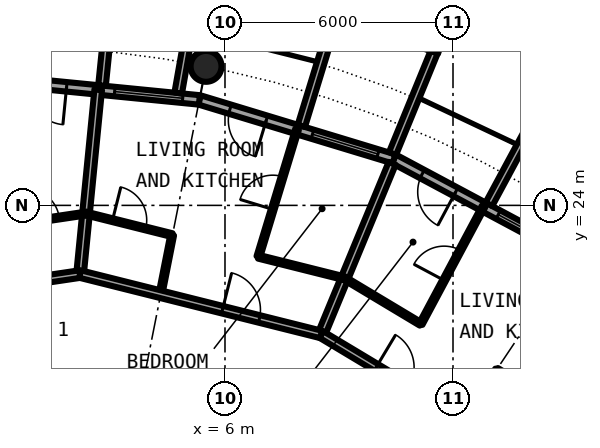
"""IFC4 building model, lengths in metres.
Left out: names, types, materials, properties, quantities, classifications, styles, units other than length and angle.
Written with IfcOpenShell. Run it as: python <this file> out.ifc"""

import sys

from ifc_helpers import new_model, si_unit, direction, frame, frame_2d, origin, origin_2d, place, context, subcontext, project, spatial, rectangle, circle, hollow_circle, extrude, element, fill, save


model = new_model("IFC4")
c1 = context("Model", 3, precision=1e-05, world=origin(), true_north=direction((0.0, 1.0)))
c2 = subcontext(c1, "Body", "Model", "MODEL_VIEW")
j1 = project(units=[si_unit("LENGTHUNIT", "METRE"), si_unit("PLANEANGLEUNIT", "RADIAN")], contexts=[c1])
p1 = place(None, origin())
s1 = spatial("IfcSite", under=j1, at=p1, CompositionType="ELEMENT")
p2 = place(p1, origin())
s2 = spatial("IfcBuilding", under=s1, at=p2, CompositionType="ELEMENT")
p3 = place(p2, frame((0.0, 0.0, 145.2)))
s3 = spatial("IfcBuildingStorey", under=s2, at=p3, CompositionType="ELEMENT", Elevation=145.2)
p4 = place(p3, frame((5.501, 27.658, 0.0), z_axis=(0.0, 0.0, 1.0), x_axis=(1.0, 0.0, 0.0)))
e1 = element("IfcColumn", 1, at=p4, inside=s3, PredefinedType="COLUMN", context=c2, shape_type="SweptSolid", body=[
    extrude(hollow_circle(Radius=0.406, WallThickness=0.04, at=origin_2d()), origin(), (0.0, 0.0, 1.0), 3.05),
])
p5 = place(p3, frame((15.167, 22.699, 0.0), z_axis=(0.0, 0.0, 1.0), x_axis=(-0.881915646801, 0.471407246368, 0.0)))
e2 = element("IfcWall", 2, at=p5, inside=s3, PredefinedType="SOLIDWALL", context=c2, shape_type="SweptSolid", body=[
    extrude(rectangle(XDim=5.352, YDim=0.25, at=frame_2d((2.676, 0.0))), origin(), (0.0, 0.0, 1.0), 2.7),
])
p6 = place(p5, frame((0.441, 0.0, 0.3)))
e3 = element("IfcOpeningElement", 3, at=p6, cuts=e2, PredefinedType="OPENING", context=c2, shape_type="SweptSolid", body=[
    extrude(rectangle(XDim=1.8, YDim=2.1, at=frame_2d((0.9, 1.05))), frame((0.0, 0.135, 0.0), z_axis=(0.0, -1.0, 0.0), x_axis=(1.0, 0.0, 0.0)), (0.0, 0.0, 1.0), 0.27),
])
p7 = place(p5, frame((3.51, 0.0, 0.0)))
e4 = element("IfcOpeningElement", 4, at=p7, cuts=e2, PredefinedType="OPENING", context=c2, shape_type="SweptSolid", body=[
    extrude(rectangle(XDim=1.0, YDim=2.2, at=frame_2d((0.5, 1.1))), frame((0.0, 0.135, 0.0), z_axis=(0.0, -1.0, 0.0), x_axis=(1.0, 0.0, 0.0)), (0.0, 0.0, 1.0), 0.27),
])
p8 = place(p3, frame((12.945, 24.029, -0.03), z_axis=(0.0, 0.0, 1.0), x_axis=(0.474424310775, 0.88029629861, 0.0)))
e5 = element("IfcWall", 5, at=p8, inside=s3, PredefinedType="SOLIDWALL", context=c2, shape_type="SweptSolid", body=[
    extrude(rectangle(XDim=3.006, YDim=0.2, at=frame_2d((1.503, 0.0))), origin(), (0.0, 0.0, 1.0), 2.73),
])
p9 = place(p3, frame((10.447, 25.222, 0.0), z_axis=(0.0, 0.0, 1.0), x_axis=(-0.956965678721, 0.290201119486, 0.0)))
e6 = element("IfcWall", 6, at=p9, inside=s3, PredefinedType="SOLIDWALL", context=c2, shape_type="SweptSolid", body=[
    extrude(rectangle(XDim=5.351, YDim=0.25, at=frame_2d((2.676, 0.0))), origin(), (0.0, 0.0, 1.0), 2.7),
])
p10 = place(p9, frame((0.441, 0.0, 0.3)))
e7 = element("IfcOpeningElement", 7, at=p10, cuts=e6, PredefinedType="OPENING", context=c2, shape_type="SweptSolid", body=[
    extrude(rectangle(XDim=1.8, YDim=2.1, at=frame_2d((0.9, 1.05))), frame((0.0, 0.135, 0.0), z_axis=(0.0, -1.0, 0.0), x_axis=(1.0, 0.0, 0.0)), (0.0, 0.0, 1.0), 0.27),
])
p11 = place(p9, frame((3.51, 0.0, 0.0)))
e8 = element("IfcOpeningElement", 8, at=p11, cuts=e6, PredefinedType="OPENING", context=c2, shape_type="SweptSolid", body=[
    extrude(rectangle(XDim=1.0, YDim=2.2, at=frame_2d((0.5, 1.1))), frame((0.0, 0.135, 0.0), z_axis=(0.0, -1.0, 0.0), x_axis=(1.0, 0.0, 0.0)), (0.0, 0.0, 1.0), 0.27),
])
p12 = place(p3, frame((11.638, 28.084, -0.03), z_axis=(0.0, 0.0, 1.0), x_axis=(-0.941461077774, 0.337121697664, 0.0)))
e9 = element("IfcWall", 9, at=p12, inside=s3, PredefinedType="SOLIDWALL", context=c2, shape_type="SweptSolid", body=[
    extrude(rectangle(XDim=2.993, YDim=0.2, at=frame_2d((1.497, 0.0))), origin(), (0.0, 0.0, 1.0), 2.73),
])
p13 = place(p12, frame((0.457, 0.0, 0.33)))
e10 = element("IfcOpeningElement", 10, at=p13, cuts=e9, PredefinedType="OPENING", context=c2, shape_type="SweptSolid", body=[
    extrude(circle(Radius=1.04, at=frame_2d((1.04, 1.04))), frame((0.0, 0.11, 0.0), z_axis=(0.0, -1.0, 0.0), x_axis=(1.0, 0.0, 0.0)), (0.0, 0.0, 1.0), 0.22),
])
p14 = place(p3, frame((10.409, 25.364, -0.03), z_axis=(0.0, 0.0, 1.0), x_axis=(0.379509886562, 0.925187681501, 0.0)))
e11 = element("IfcWall", 11, at=p14, inside=s3, PredefinedType="SOLIDWALL", context=c2, shape_type="SweptSolid", body=[
    extrude(rectangle(XDim=2.883, YDim=0.2, at=frame_2d((1.441, 0.0))), origin(), (0.0, 0.0, 1.0), 2.73),
])
p15 = place(p3, frame((8.009, 26.092, -0.03), z_axis=(0.0, 0.0, 1.0), x_axis=(0.293406695073, 0.955987715029, 0.0)))
e12 = element("IfcWall", 12, at=p15, inside=s3, PredefinedType="SOLIDWALL", context=c2, shape_type="SweptSolid", body=[
    extrude(rectangle(XDim=3.006, YDim=0.2, at=frame_2d((1.503, 0.0))), origin(), (0.0, 0.0, 1.0), 2.73),
])
p16 = place(p3, frame((5.326, 26.775, 0.0), z_axis=(0.0, 0.0, 1.0), x_axis=(-0.995173996315, 0.098126026407, 0.0)))
e13 = element("IfcWall", 13, at=p16, inside=s3, PredefinedType="SOLIDWALL", context=c2, shape_type="SweptSolid", body=[
    extrude(rectangle(XDim=5.352, YDim=0.25, at=frame_2d((2.676, 0.0))), origin(), (0.0, 0.0, 1.0), 2.7),
])
p17 = place(p16, frame((0.441, 0.0, 0.3)))
e14 = element("IfcOpeningElement", 14, at=p17, cuts=e13, PredefinedType="OPENING", context=c2, shape_type="SweptSolid", body=[
    extrude(rectangle(XDim=1.8, YDim=2.1, at=frame_2d((0.9, 1.05))), frame((0.0, 0.135, 0.0), z_axis=(0.0, -1.0, 0.0), x_axis=(1.0, 0.0, 0.0)), (0.0, 0.0, 1.0), 0.27),
])
p18 = place(p16, frame((3.51, 0.0, 0.0)))
e15 = element("IfcOpeningElement", 15, at=p18, cuts=e13, PredefinedType="OPENING", context=c2, shape_type="SweptSolid", body=[
    extrude(rectangle(XDim=1.0, YDim=2.2, at=frame_2d((0.5, 1.1))), frame((0.0, 0.135, 0.0), z_axis=(0.0, -1.0, 0.0), x_axis=(1.0, 0.0, 0.0)), (0.0, 0.0, 1.0), 0.27),
])
p19 = place(p3, frame((4.769, 26.956, -0.03), z_axis=(0.0, 0.0, 1.0), x_axis=(0.174056778901, 0.984735618183, 0.0)))
e16 = element("IfcWall", 16, at=p19, inside=s3, PredefinedType="SOLIDWALL", context=c2, shape_type="SweptSolid", body=[
    extrude(rectangle(XDim=2.925, YDim=0.2, at=frame_2d((1.462, 0.0))), origin(), (0.0, 0.0, 1.0), 2.73),
])
p20 = place(p3, frame((2.764, 27.153, -0.03), z_axis=(0.0, 0.0, 1.0), x_axis=(0.101505487237, 0.994834979311, 0.0)))
e17 = element("IfcWall", 17, at=p20, inside=s3, PredefinedType="SOLIDWALL", context=c2, shape_type="SweptSolid", body=[
    extrude(rectangle(XDim=3.007, YDim=0.2, at=frame_2d((1.503, 0.0))), origin(), (0.0, 0.0, 1.0), 2.73),
])
p21 = place(p3, frame((4.302, 21.663, 0.0), z_axis=(0.0, 0.0, 1.0), x_axis=(0.194485862594, 0.980905321247, 0.0)))
e18 = element("IfcWall", 18, at=p21, inside=s3, PredefinedType="PARTITIONING", context=c2, shape_type="SweptSolid", body=[
    extrude(rectangle(XDim=1.584, YDim=0.1, at=frame_2d((0.792, 0.0))), origin(), (0.0, 0.0, 1.0), 2.7),
])
p22 = place(p3, frame((2.186, 22.193, 0.0), z_axis=(0.0, 0.0, 1.0), x_axis=(0.098070432075, 0.995179476453, 0.0)))
e19 = element("IfcWall", 19, at=p22, inside=s3, PredefinedType="PARTITIONING", context=c2, shape_type="SweptSolid", body=[
    extrude(rectangle(XDim=4.874, YDim=0.2, at=frame_2d((2.437, 0.0))), origin(), (0.0, 0.0, 1.0), 2.7),
])
p23 = place(p3, frame((6.878, 22.649, 0.0), z_axis=(0.0, 0.0, 1.0), x_axis=(0.290784578865, 0.956788549625, 0.0)))
e20 = element("IfcWall", 20, at=p23, inside=s3, PredefinedType="PARTITIONING", context=c2, shape_type="SweptSolid", body=[
    extrude(rectangle(XDim=3.504, YDim=0.1, at=frame_2d((1.752, 0.0))), origin(), (0.0, 0.0, 1.0), 2.7),
])
p24 = place(p23, frame((1.302, 0.0, 0.0)))
e21 = element("IfcOpeningElement", 21, at=p24, cuts=e20, PredefinedType="OPENING", context=c2, shape_type="SweptSolid", body=[
    extrude(rectangle(XDim=0.9, YDim=2.3, at=frame_2d((0.45, 1.15))), frame((0.0, 0.06, 0.0), z_axis=(0.0, -1.0, 0.0), x_axis=(1.0, 0.0, 0.0)), (0.0, 0.0, 1.0), 0.12),
])
p25 = place(p3, frame((8.534, 20.603, 0.0), z_axis=(0.0, 0.0, 1.0), x_axis=(0.382651153718, 0.923892902104, 0.0)))
e22 = element("IfcWall", 22, at=p25, inside=s3, PredefinedType="PARTITIONING", context=c2, shape_type="SweptSolid", body=[
    extrude(rectangle(XDim=4.874, YDim=0.2, at=frame_2d((2.437, 0.0))), origin(), (0.0, 0.0, 1.0), 2.7),
])
p26 = place(p3, frame((11.151, 20.879, 0.0), z_axis=(0.0, 0.0, 1.0), x_axis=(0.471372600501, 0.881934165058, 0.0)))
e23 = element("IfcWall", 23, at=p26, inside=s3, PredefinedType="PARTITIONING", context=c2, shape_type="SweptSolid", body=[
    extrude(rectangle(XDim=3.505, YDim=0.1, at=frame_2d((1.752, 0.0))), origin(), (0.0, 0.0, 1.0), 2.7),
])
p27 = place(p26, frame((1.302, 0.0, 0.0)))
e24 = element("IfcOpeningElement", 24, at=p27, cuts=e23, PredefinedType="OPENING", context=c2, shape_type="SweptSolid", body=[
    extrude(rectangle(XDim=0.9, YDim=2.3, at=frame_2d((0.45, 1.15))), frame((0.0, 0.06, 0.0), z_axis=(0.0, -1.0, 0.0), x_axis=(1.0, 0.0, 0.0)), (0.0, 0.0, 1.0), 0.12),
])
p28 = place(p3, frame((-8.534, 20.603, 0.0), z_axis=(0.0, 0.0, 1.0), x_axis=(0.989177441421, 0.146724194948, 0.0)))
e25 = element("IfcWall", 25, at=p28, inside=s3, PredefinedType="PARTITIONING", context=c2, shape_type="SweptSolid", body=[
    extrude(rectangle(XDim=10.837, YDim=0.2, at=frame_2d((5.418, 0.0))), origin(), (0.0, 0.0, 1.0), 2.7),
])
p29 = place(p28, frame((3.835, 0.0, 0.0)))
e26 = element("IfcOpeningElement", 26, at=p29, cuts=e25, PredefinedType="OPENING", context=c2, shape_type="SweptSolid", body=[
    extrude(rectangle(XDim=1.0, YDim=2.3, at=frame_2d((0.5, 1.15))), frame((0.0, 0.11, 0.0), z_axis=(0.0, -1.0, 0.0), x_axis=(1.0, 0.0, 0.0)), (0.0, 0.0, 1.0), 0.22),
])
p30 = place(p3, frame((2.186, 22.193, 0.0), z_axis=(0.0, 0.0, 1.0), x_axis=(0.97003047456, -0.242983288366, 0.0)))
e27 = element("IfcWall", 27, at=p30, inside=s3, PredefinedType="PARTITIONING", context=c2, shape_type="SweptSolid", body=[
    extrude(rectangle(XDim=6.544, YDim=0.2, at=frame_2d((3.272, 0.0))), origin(), (0.0, 0.0, 1.0), 2.7),
])
p31 = place(p30, frame((3.863, 0.0, 0.0)))
e28 = element("IfcOpeningElement", 28, at=p31, cuts=e27, PredefinedType="OPENING", context=c2, shape_type="SweptSolid", body=[
    extrude(rectangle(XDim=1.0, YDim=2.3, at=frame_2d((0.5, 1.15))), frame((0.0, 0.11, 0.0), z_axis=(0.0, -1.0, 0.0), x_axis=(1.0, 0.0, 0.0)), (0.0, 0.0, 1.0), 0.22),
])
p32 = place(p3, frame((8.534, 20.603, 0.0), z_axis=(0.0, 0.0, 1.0), x_axis=(0.857683781508, -0.514177528621, 0.0)))
e29 = element("IfcWall", 29, at=p32, inside=s3, PredefinedType="PARTITIONING", context=c2, shape_type="SweptSolid", body=[
    extrude(rectangle(XDim=6.544, YDim=0.2, at=frame_2d((3.272, 0.0))), origin(), (0.0, 0.0, 1.0), 2.7),
])
p33 = place(p32, frame((1.682, 0.0, 0.0)))
e30 = element("IfcOpeningElement", 30, at=p33, cuts=e29, PredefinedType="OPENING", context=c2, shape_type="SweptSolid", body=[
    extrude(rectangle(XDim=1.0, YDim=2.3, at=frame_2d((0.5, 1.15))), frame((0.0, 0.11, 0.0), z_axis=(0.0, -1.0, 0.0), x_axis=(1.0, 0.0, 0.0)), (0.0, 0.0, 1.0), 0.22),
])
p34 = place(p3, frame((0.045, 23.444, 0.0), z_axis=(0.0, 0.0, 1.0), x_axis=(0.989180881673, 0.146700999768, 0.0)))
e31 = element("IfcWall", 31, at=p34, inside=s3, PredefinedType="PARTITIONING", context=c2, shape_type="SweptSolid", body=[
    extrude(rectangle(XDim=2.323, YDim=0.1, at=frame_2d((1.162, 0.0))), origin(), (0.0, 0.0, 1.0), 2.7),
])
p35 = place(p34, frame((0.712, 0.0, 0.0)))
e32 = element("IfcOpeningElement", 32, at=p35, cuts=e31, PredefinedType="OPENING", context=c2, shape_type="SweptSolid", body=[
    extrude(rectangle(XDim=0.9, YDim=2.3, at=frame_2d((0.45, 1.15))), frame((0.0, 0.06, 0.0), z_axis=(0.0, -1.0, 0.0), x_axis=(1.0, 0.0, 0.0)), (0.0, 0.0, 1.0), 0.12),
])
p36 = place(p3, frame((2.343, 23.785, 0.0), z_axis=(0.0, 0.0, 1.0), x_axis=(0.970031792706, -0.242978026043, 0.0)))
e33 = element("IfcWall", 33, at=p36, inside=s3, PredefinedType="PARTITIONING", context=c2, shape_type="SweptSolid", body=[
    extrude(rectangle(XDim=2.337, YDim=0.1, at=frame_2d((1.168, 0.0))), origin(), (0.0, 0.0, 1.0), 2.7),
])
p37 = place(p36, frame((0.719, 0.0, 0.0)))
e34 = element("IfcOpeningElement", 34, at=p37, cuts=e33, PredefinedType="OPENING", context=c2, shape_type="SweptSolid", body=[
    extrude(rectangle(XDim=0.9, YDim=2.3, at=frame_2d((0.45, 1.15))), frame((0.0, 0.06, 0.0), z_axis=(0.0, -1.0, 0.0), x_axis=(1.0, 0.0, 0.0)), (0.0, 0.0, 1.0), 0.12),
])
p38 = place(p3, frame((6.88, 22.648, 0.0), z_axis=(0.0, 0.0, 1.0), x_axis=(0.9700564467, -0.242879579658, 0.0)))
e35 = element("IfcWall", 35, at=p38, inside=s3, PredefinedType="PARTITIONING", context=c2, shape_type="SweptSolid", body=[
    extrude(rectangle(XDim=2.338, YDim=0.1, at=frame_2d((1.169, 0.0))), origin(), (0.0, 0.0, 1.0), 2.7),
])
p39 = place(p3, frame((9.146, 22.081, 0.0), z_axis=(0.0, 0.0, 1.0), x_axis=(0.857640331606, -0.514249999127, 0.0)))
e36 = element("IfcWall", 36, at=p39, inside=s3, PredefinedType="PARTITIONING", context=c2, shape_type="SweptSolid", body=[
    extrude(rectangle(XDim=2.338, YDim=0.1, at=frame_2d((1.169, 0.0))), origin(), (0.0, 0.0, 1.0), 2.7),
])
p40 = place(p6, origin())
e37 = element("IfcWindow", 37, at=p40, inside=s3, PartitioningType="SINGLE_PANEL", PredefinedType="WINDOW", context=c2, shape_type="SweptSolid", body=[
    extrude(rectangle(XDim=1.8, YDim=2.1, at=frame_2d((0.9, 1.05))), frame((0.0, 0.03, 0.0), z_axis=(0.0, -1.0, 0.0), x_axis=(1.0, 0.0, 0.0)), (0.0, 0.0, 1.0), 0.06),
])
fill(e3, e37)
p41 = place(p7, origin())
e38 = element("IfcDoor", 38, at=p41, inside=s3, OperationType="SINGLE_SWING_LEFT", PredefinedType="DOOR", context=c2, shape_type="SweptSolid", body=[
    extrude(rectangle(XDim=1.0, YDim=2.2, at=frame_2d((0.5, 1.1))), frame((0.0, 0.025, 0.0), z_axis=(0.0, -1.0, 0.0), x_axis=(1.0, 0.0, 0.0)), (0.0, 0.0, 1.0), 0.05),
])
fill(e4, e38)
p42 = place(p10, origin())
e39 = element("IfcWindow", 39, at=p42, inside=s3, PartitioningType="SINGLE_PANEL", PredefinedType="WINDOW", context=c2, shape_type="SweptSolid", body=[
    extrude(rectangle(XDim=1.8, YDim=2.1, at=frame_2d((0.9, 1.05))), frame((0.0, 0.03, 0.0), z_axis=(0.0, -1.0, 0.0), x_axis=(1.0, 0.0, 0.0)), (0.0, 0.0, 1.0), 0.06),
])
fill(e7, e39)
p43 = place(p11, origin())
e40 = element("IfcDoor", 40, at=p43, inside=s3, OperationType="SINGLE_SWING_LEFT", PredefinedType="DOOR", context=c2, shape_type="SweptSolid", body=[
    extrude(rectangle(XDim=1.0, YDim=2.2, at=frame_2d((0.5, 1.1))), frame((0.0, 0.025, 0.0), z_axis=(0.0, -1.0, 0.0), x_axis=(1.0, 0.0, 0.0)), (0.0, 0.0, 1.0), 0.05),
])
fill(e8, e40)
p44 = place(p17, origin())
e41 = element("IfcWindow", 41, at=p44, inside=s3, PartitioningType="SINGLE_PANEL", PredefinedType="WINDOW", context=c2, shape_type="SweptSolid", body=[
    extrude(rectangle(XDim=1.8, YDim=2.1, at=frame_2d((0.9, 1.05))), frame((0.0, 0.03, 0.0), z_axis=(0.0, -1.0, 0.0), x_axis=(1.0, 0.0, 0.0)), (0.0, 0.0, 1.0), 0.06),
])
fill(e14, e41)
p45 = place(p18, origin())
e42 = element("IfcDoor", 42, at=p45, inside=s3, OperationType="SINGLE_SWING_LEFT", PredefinedType="DOOR", context=c2, shape_type="SweptSolid", body=[
    extrude(rectangle(XDim=1.0, YDim=2.2, at=frame_2d((0.5, 1.1))), frame((0.0, 0.025, 0.0), z_axis=(0.0, -1.0, 0.0), x_axis=(1.0, 0.0, 0.0)), (0.0, 0.0, 1.0), 0.05),
])
fill(e15, e42)
p46 = place(p33, origin())
e43 = element("IfcDoor", 43, at=p46, inside=s3, OperationType="SINGLE_SWING_LEFT", PredefinedType="DOOR", context=c2, shape_type="SweptSolid", body=[
    extrude(rectangle(XDim=1.0, YDim=2.3, at=frame_2d((0.5, 1.15))), frame((0.0, 0.025, 0.0), z_axis=(0.0, -1.0, 0.0), x_axis=(1.0, 0.0, 0.0)), (0.0, 0.0, 1.0), 0.05),
])
fill(e30, e43)
p47 = place(p27, origin())
e44 = element("IfcDoor", 44, at=p47, inside=s3, OperationType="SINGLE_SWING_LEFT", PredefinedType="DOOR", context=c2, shape_type="SweptSolid", body=[
    extrude(rectangle(XDim=0.9, YDim=2.3, at=frame_2d((0.45, 1.15))), frame((0.0, 0.025, 0.0), z_axis=(0.0, -1.0, 0.0), x_axis=(1.0, 0.0, 0.0)), (0.0, 0.0, 1.0), 0.05),
])
fill(e24, e44)
p48 = place(p31, origin())
e45 = element("IfcDoor", 45, at=p48, inside=s3, OperationType="SINGLE_SWING_RIGHT", PredefinedType="DOOR", context=c2, shape_type="SweptSolid", body=[
    extrude(rectangle(XDim=1.0, YDim=2.3, at=frame_2d((0.5, 1.15))), frame((0.0, 0.025, 0.0), z_axis=(0.0, -1.0, 0.0), x_axis=(1.0, 0.0, 0.0)), (0.0, 0.0, 1.0), 0.05),
])
fill(e28, e45)
p49 = place(p37, origin())
e46 = element("IfcDoor", 46, at=p49, inside=s3, OperationType="SINGLE_SWING_RIGHT", PredefinedType="DOOR", context=c2, shape_type="SweptSolid", body=[
    extrude(rectangle(XDim=0.9, YDim=2.3, at=frame_2d((0.45, 1.15))), frame((0.0, 0.025, 0.0), z_axis=(0.0, -1.0, 0.0), x_axis=(1.0, 0.0, 0.0)), (0.0, 0.0, 1.0), 0.05),
])
fill(e34, e46)
p50 = place(p24, origin())
e47 = element("IfcDoor", 47, at=p50, inside=s3, OperationType="SINGLE_SWING_LEFT", PredefinedType="DOOR", context=c2, shape_type="SweptSolid", body=[
    extrude(rectangle(XDim=0.9, YDim=2.3, at=frame_2d((0.45, 1.15))), frame((0.0, 0.025, 0.0), z_axis=(0.0, -1.0, 0.0), x_axis=(1.0, 0.0, 0.0)), (0.0, 0.0, 1.0), 0.05),
])
fill(e21, e47)
p51 = place(p35, origin())
e48 = element("IfcDoor", 48, at=p51, inside=s3, OperationType="SINGLE_SWING_LEFT", PredefinedType="DOOR", context=c2, shape_type="SweptSolid", body=[
    extrude(rectangle(XDim=0.9, YDim=2.3, at=frame_2d((0.45, 1.15))), frame((0.0, 0.025, 0.0), z_axis=(0.0, -1.0, 0.0), x_axis=(1.0, 0.0, 0.0)), (0.0, 0.0, 1.0), 0.05),
])
fill(e32, e48)
save(model, sys.argv[1])
